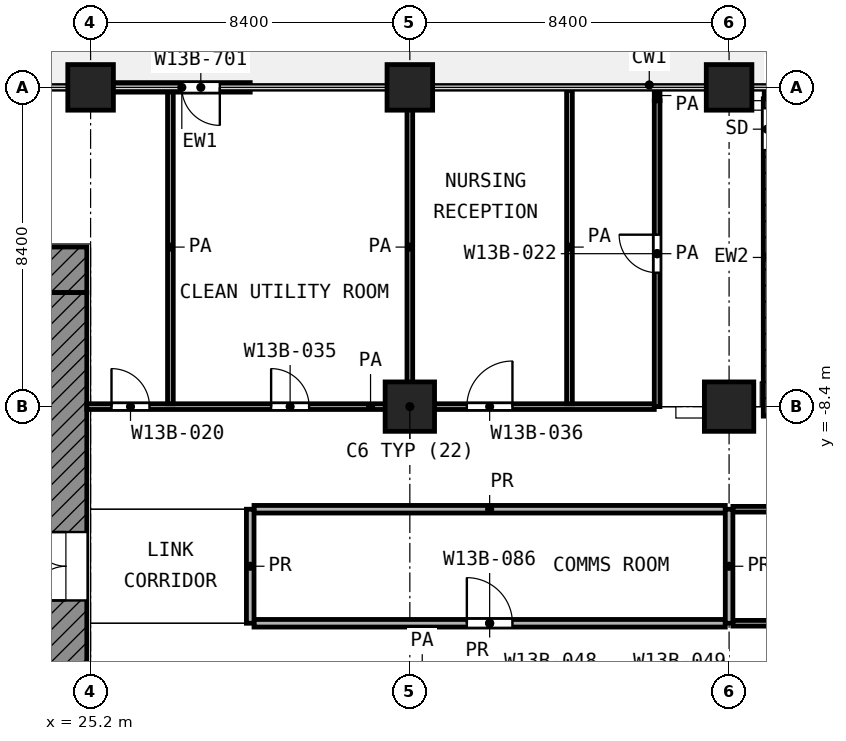
"""IFC4 building model, lengths in metres.
Left out: names, types, materials, properties, quantities, classifications, styles, units other than length and angle.
Written with IfcOpenShell. Run it as: python <this file> out.ifc"""

import sys

from ifc_helpers import new_model, si_unit, direction, frame, frame_2d, origin, origin_2d, place, context, subcontext, project, spatial, rectangle, extrude, element, fill, save


model = new_model("IFC4")
c1 = context("Model", 3, precision=1e-05, world=origin(), true_north=direction((0.0, 1.0)))
c2 = subcontext(c1, "Body", "Model", "MODEL_VIEW")
j1 = project(units=[si_unit("LENGTHUNIT", "METRE"), si_unit("PLANEANGLEUNIT", "RADIAN")], contexts=[c1])
p1 = place(None, origin())
s1 = spatial("IfcSite", under=j1, at=p1, CompositionType="ELEMENT")
p2 = place(p1, origin())
s2 = spatial("IfcBuilding", under=s1, at=p2, CompositionType="ELEMENT")
p3 = place(p2, frame((0.0, 0.0, 89.6)))
s3 = spatial("IfcBuildingStorey", under=s2, at=p3, CompositionType="ELEMENT", Elevation=89.6)
for number, where, z_axis, x_axis in (
    (1, (25.2, 0.0, 0.0), (0.0, 0.0, 1.0), (1.0, 0.0, 0.0)),
    (2, (33.6, 0.0, 0.0), (0.0, 0.0, 1.0), (1.0, 0.0, 0.0)),
    (3, (42.0, 0.0, 0.0), (0.0, 0.0, 1.0), (1.0, 0.0, 0.0)),
):
    element("IfcColumn", number, at=place(p3, frame(where, z_axis=z_axis, x_axis=x_axis)), inside=s3, PredefinedType="COLUMN", context=c2, shape_type="SweptSolid", body=[
        extrude(rectangle(XDim=1.2, YDim=1.2, at=origin_2d()), origin(), (0.0, 0.0, 1.0), 4.2),
    ])
for number, where, z_axis, x_axis in (
    (4, (33.6, -8.4, 0.0), (0.0, 0.0, 1.0), (1.0, 0.0, 0.0)),
    (5, (42.0, -8.4, 0.0), (0.0, 0.0, 1.0), (1.0, 0.0, 0.0)),
):
    element("IfcColumn", number, at=place(p3, frame(where, z_axis=z_axis, x_axis=x_axis)), inside=s3, PredefinedType="COLUMN", context=c2, shape_type="SweptSolid", body=[
        extrude(rectangle(XDim=1.3, YDim=1.3, at=origin_2d()), origin(), (0.0, 0.0, 1.0), 4.2),
    ])
p4 = place(p3, frame((29.4, 0.0, 0.0), z_axis=(0.0, 0.0, 1.0), x_axis=(-1.0, 0.0, 0.0)))
e6 = element("IfcWall", 6, at=p4, inside=s3, PredefinedType="SOLIDWALL", context=c2, shape_type="SweptSolid", body=[
    extrude(rectangle(XDim=3.6, YDim=0.25, at=frame_2d((1.8, 0.0))), origin(), (0.0, 0.0, 1.0), 3.58),
])
p5 = place(p4, frame((0.8, 0.0, 0.0)))
e7 = element("IfcOpeningElement", 7, at=p5, cuts=e6, PredefinedType="OPENING", context=c2, shape_type="SweptSolid", body=[
    extrude(rectangle(XDim=1.0, YDim=2.1, at=frame_2d((0.5, 1.05))), frame((0.0, 0.135, 0.0), z_axis=(0.0, -1.0, 0.0), x_axis=(1.0, 0.0, 0.0)), (0.0, 0.0, 1.0), 0.27),
])
p6 = place(p3, frame((4.2, -4.8, 0.0), z_axis=(0.0, 0.0, 1.0), x_axis=(1.0, 0.0, 0.0)))
e8 = element("IfcWall", 8, at=p6, inside=s3, PredefinedType="SHEAR", context=c2, shape_type="SweptSolid", body=[
    extrude(rectangle(XDim=20.9, YDim=1.2, at=frame_2d((10.45, 0.0))), origin(), (0.0, 0.0, 1.0), 3.7),
])
p7 = place(p6, frame((1.95, 0.0, 0.0)))
e9 = element("IfcOpeningElement", 9, at=p7, cuts=e8, PredefinedType="OPENING", context=c2, shape_type="SweptSolid", body=[
    extrude(rectangle(XDim=1.1, YDim=2.1, at=frame_2d((0.55, 1.05))), frame((0.0, 0.61, 0.0), z_axis=(0.0, -1.0, 0.0), x_axis=(1.0, 0.0, 0.0)), (0.0, 0.0, 1.0), 1.22),
])
p8 = place(p6, frame((17.95, 0.0, 0.0)))
e10 = element("IfcOpeningElement", 10, at=p8, cuts=e8, PredefinedType="OPENING", context=c2, shape_type="SweptSolid", body=[
    extrude(rectangle(XDim=1.1, YDim=2.1, at=frame_2d((0.55, 1.05))), frame((0.0, 0.61, 0.0), z_axis=(0.0, -1.0, 0.0), x_axis=(1.0, 0.0, 0.0)), (0.0, 0.0, 1.0), 1.22),
])
p9 = place(p3, frame((24.55, -24.0, 0.0), z_axis=(0.0, 0.0, 1.0), x_axis=(0.0, 1.0, 0.0)))
e11 = element("IfcWall", 11, at=p9, inside=s3, PredefinedType="SHEAR", context=c2, shape_type="SweptSolid", body=[
    extrude(rectangle(XDim=18.6, YDim=1.1, at=frame_2d((9.3, 0.0))), origin(), (0.0, 0.0, 1.0), 3.7),
])
p10 = place(p9, frame((10.5, 0.0, 0.0)))
e12 = element("IfcOpeningElement", 12, at=p10, cuts=e11, PredefinedType="OPENING", context=c2, shape_type="SweptSolid", body=[
    extrude(rectangle(XDim=1.8, YDim=2.1, at=frame_2d((0.9, 1.05))), frame((0.0, 0.56, 0.0), z_axis=(0.0, -1.0, 0.0), x_axis=(1.0, 0.0, 0.0)), (0.0, 0.0, 1.0), 1.12),
])
p11 = place(p3, frame((43.0, -8.65, 0.0), z_axis=(0.0, 0.0, 1.0), x_axis=(0.0, 1.0, 0.0)))
e13 = element("IfcWall", 13, at=p11, inside=s3, PredefinedType="SHEAR", context=c2, shape_type="SweptSolid", body=[
    extrude(rectangle(XDim=8.35, YDim=0.2, at=frame_2d((4.175, 0.0))), origin(), (0.0, 0.0, 1.0), 3.7),
])
p12 = place(p11, frame((7.0, 0.0, 0.0)))
e14 = element("IfcOpeningElement", 14, at=p12, cuts=e13, PredefinedType="OPENING", context=c2, shape_type="SweptSolid", body=[
    extrude(rectangle(XDim=1.1, YDim=2.1, at=frame_2d((0.55, 1.05))), frame((0.0, 0.11, 0.0), z_axis=(0.0, -1.0, 0.0), x_axis=(1.0, 0.0, 0.0)), (0.0, 0.0, 1.0), 0.22),
])
p13 = place(p3, frame((42.1, -14.1, 0.0), z_axis=(0.0, 0.0, 1.0), x_axis=(1.0, 0.0, 0.0)))
e15 = element("IfcWall", 15, at=p13, inside=s3, PredefinedType="PARTITIONING", context=c2, shape_type="SweptSolid", body=[
    extrude(rectangle(XDim=34.925, YDim=0.15, at=frame_2d((17.462, 0.0))), origin(), (0.0, 0.0, 1.0), 3.7),
])
p14 = place(p13, frame((20.55, 0.0, 0.0)))
e16 = element("IfcOpeningElement", 16, at=p14, cuts=e15, PredefinedType="OPENING", context=c2, shape_type="SweptSolid", body=[
    extrude(rectangle(XDim=1.0, YDim=2.1, at=frame_2d((0.5, 1.05))), frame((0.0, 0.085, 0.0), z_axis=(0.0, -1.0, 0.0), x_axis=(1.0, 0.0, 0.0)), (0.0, 0.0, 1.0), 0.17),
])
p15 = place(p13, frame((31.65, 0.0, 0.0)))
e17 = element("IfcOpeningElement", 17, at=p15, cuts=e15, PredefinedType="OPENING", context=c2, shape_type="SweptSolid", body=[
    extrude(rectangle(XDim=1.0, YDim=2.1, at=frame_2d((0.5, 1.05))), frame((0.0, 0.085, 0.0), z_axis=(0.0, -1.0, 0.0), x_axis=(1.0, 0.0, 0.0)), (0.0, 0.0, 1.0), 0.17),
])
p16 = place(p3, frame((42.1, -11.1, 0.0), z_axis=(0.0, 0.0, 1.0), x_axis=(1.0, 0.0, 0.0)))
e18 = element("IfcWall", 18, at=p16, inside=s3, PredefinedType="PARTITIONING", context=c2, shape_type="SweptSolid", body=[
    extrude(rectangle(XDim=34.925, YDim=0.15, at=frame_2d((17.462, 0.0))), origin(), (0.0, 0.0, 1.0), 3.7),
])
p17 = place(p16, frame((5.75, 0.0, 0.0)))
e19 = element("IfcOpeningElement", 19, at=p17, cuts=e18, PredefinedType="OPENING", context=c2, shape_type="SweptSolid", body=[
    extrude(rectangle(XDim=1.2, YDim=2.1, at=frame_2d((0.6, 1.05))), frame((0.0, 0.085, 0.0), z_axis=(0.0, -1.0, 0.0), x_axis=(1.0, 0.0, 0.0)), (0.0, 0.0, 1.0), 0.17),
])
p18 = place(p3, frame((25.1, -8.4, 0.0), z_axis=(0.0, 0.0, 1.0), x_axis=(1.0, 0.0, 0.0)))
e20 = element("IfcWall", 20, at=p18, inside=s3, PredefinedType="PARTITIONING", context=c2, shape_type="SweptSolid", body=[
    extrude(rectangle(XDim=14.932, YDim=0.15, at=frame_2d((7.466, 0.0))), origin(), (0.0, 0.0, 1.0), 3.7),
])
p19 = place(p18, frame((10.0, 0.0, 0.0)))
e21 = element("IfcOpeningElement", 21, at=p19, cuts=e20, PredefinedType="OPENING", context=c2, shape_type="SweptSolid", body=[
    extrude(rectangle(XDim=1.2, YDim=2.1, at=frame_2d((0.6, 1.05))), frame((0.0, 0.085, 0.0), z_axis=(0.0, -1.0, 0.0), x_axis=(1.0, 0.0, 0.0)), (0.0, 0.0, 1.0), 0.17),
])
p20 = place(p18, frame((0.65, 0.0, 0.0)))
e22 = element("IfcOpeningElement", 22, at=p20, cuts=e20, PredefinedType="OPENING", context=c2, shape_type="SweptSolid", body=[
    extrude(rectangle(XDim=1.0, YDim=2.1, at=frame_2d((0.5, 1.05))), frame((0.0, 0.085, 0.0), z_axis=(0.0, -1.0, 0.0), x_axis=(1.0, 0.0, 0.0)), (0.0, 0.0, 1.0), 0.17),
])
p21 = place(p18, frame((4.85, 0.0, 0.0)))
e23 = element("IfcOpeningElement", 23, at=p21, cuts=e20, PredefinedType="OPENING", context=c2, shape_type="SweptSolid", body=[
    extrude(rectangle(XDim=1.0, YDim=2.1, at=frame_2d((0.5, 1.05))), frame((0.0, 0.085, 0.0), z_axis=(0.0, -1.0, 0.0), x_axis=(1.0, 0.0, 0.0)), (0.0, 0.0, 1.0), 0.17),
])
for number, where, z_axis, x_axis in (
    (24, (27.3, -8.325, 0.0), (0.0, 0.0, 1.0), (0.0, 1.0, 0.0)),
    (25, (33.6, -8.325, 0.0), (0.0, 0.0, 1.0), (0.0, 1.0, 0.0)),
    (26, (37.8, -8.325, 0.0), (0.0, 0.0, 1.0), (0.0, 1.0, 0.0)),
):
    element("IfcWall", number, at=place(p3, frame(where, z_axis=z_axis, x_axis=x_axis)), inside=s3, PredefinedType="PARTITIONING", context=c2, shape_type="SweptSolid", body=[
        extrude(rectangle(XDim=8.245, YDim=0.15, at=frame_2d((4.123, 0.0))), origin(), (0.0, 0.0, 1.0), 3.7),
    ])
p22 = place(p3, frame((40.107, -8.4, 0.0), z_axis=(0.0, 0.0, 1.0), x_axis=(0.0, 1.0, 0.0)))
e27 = element("IfcWall", 27, at=p22, inside=s3, PredefinedType="PARTITIONING", context=c2, shape_type="SweptSolid", body=[
    extrude(rectangle(XDim=8.048, YDim=0.15, at=frame_2d((4.024, 0.0))), origin(), (0.0, 0.0, 1.0), 3.7),
])
p23 = place(p22, frame((3.524, 0.0, 0.0)))
e28 = element("IfcOpeningElement", 28, at=p23, cuts=e27, PredefinedType="OPENING", context=c2, shape_type="SweptSolid", body=[
    extrude(rectangle(XDim=1.0, YDim=2.1, at=frame_2d((0.5, 1.05))), frame((0.0, 0.085, 0.0), z_axis=(0.0, -1.0, 0.0), x_axis=(1.0, 0.0, 0.0)), (0.0, 0.0, 1.0), 0.17),
])
p24 = place(p3, frame((40.107, -0.35, 0.0), z_axis=(0.0, 0.0, 1.0), x_axis=(0.0, 1.0, 0.0)))
e29 = element("IfcWall", 29, at=p24, inside=s3, PredefinedType="PARTITIONING", context=c2, shape_type="SweptSolid", body=[
    extrude(rectangle(XDim=0.27, YDim=0.15, at=frame_2d((0.135, 0.0))), origin(), (0.0, 0.0, 1.0), 3.7),
])
p25 = place(p3, frame((43.0, -0.27, 0.0), z_axis=(0.0, 0.0, 1.0), x_axis=(0.0, 1.0, 0.0)))
e30 = element("IfcWall", 30, at=p25, inside=s3, PredefinedType="PARTITIONING", context=c2, shape_type="SweptSolid", body=[
    extrude(rectangle(XDim=0.19, YDim=0.15, at=frame_2d((0.095, 0.0))), origin(), (0.0, 0.0, 1.0), 3.7),
])
p26 = place(p3, frame((29.5, -14.1, 0.0), z_axis=(0.0, 0.0, 1.0), x_axis=(1.0, 0.0, 0.0)))
e31 = element("IfcWall", 31, at=p26, inside=s3, PredefinedType="PARTITIONING", context=c2, shape_type="SweptSolid", body=[
    extrude(rectangle(XDim=12.4, YDim=0.2, at=frame_2d((6.2, 0.0))), origin(), (0.0, 0.0, 1.0), 3.7),
])
p27 = place(p26, frame((5.6, 0.0, 0.0)))
e32 = element("IfcOpeningElement", 32, at=p27, cuts=e31, PredefinedType="OPENING", context=c2, shape_type="SweptSolid", body=[
    extrude(rectangle(XDim=1.2, YDim=2.1, at=frame_2d((0.6, 1.05))), frame((0.0, 0.11, 0.0), z_axis=(0.0, -1.0, 0.0), x_axis=(1.0, 0.0, 0.0)), (0.0, 0.0, 1.0), 0.22),
])
p28 = place(p3, frame((29.5, -11.1, 0.0), z_axis=(0.0, 0.0, 1.0), x_axis=(1.0, 0.0, 0.0)))
e33 = element("IfcWall", 33, at=p28, inside=s3, PredefinedType="PARTITIONING", context=c2, shape_type="SweptSolid", body=[
    extrude(rectangle(XDim=12.4, YDim=0.2, at=frame_2d((6.2, 0.0))), origin(), (0.0, 0.0, 1.0), 3.7),
])
for number, where, z_axis, x_axis in (
    (34, (29.4, -14.1, 0.0), (0.0, 0.0, 1.0), (0.0, 1.0, 0.0)),
    (35, (42.0, -14.1, 0.0), (0.0, 0.0, 1.0), (0.0, 1.0, 0.0)),
):
    element("IfcWall", number, at=place(p3, frame(where, z_axis=z_axis, x_axis=x_axis)), inside=s3, PredefinedType="PARTITIONING", context=c2, shape_type="SweptSolid", body=[
        extrude(rectangle(XDim=3.0, YDim=0.2, at=frame_2d((1.5, 0.0))), origin(), (0.0, 0.0, 1.0), 3.7),
    ])
p29 = place(p5, origin())
e36 = element("IfcDoor", 36, at=p29, inside=s3, OperationType="SINGLE_SWING_LEFT", PredefinedType="DOOR", context=c2, shape_type="SweptSolid", body=[
    extrude(rectangle(XDim=1.0, YDim=2.1, at=frame_2d((0.5, 1.05))), frame((0.0, 0.025, 0.0), z_axis=(0.0, -1.0, 0.0), x_axis=(1.0, 0.0, 0.0)), (0.0, 0.0, 1.0), 0.05),
])
fill(e7, e36)
p30 = place(p10, origin())
e37 = element("IfcDoor", 37, at=p30, inside=s3, OperationType="DOUBLE_DOOR_SINGLE_SWING", PredefinedType="DOOR", context=c2, shape_type="SweptSolid", body=[
    extrude(rectangle(XDim=1.8, YDim=2.1, at=frame_2d((0.9, 1.05))), frame((0.0, 0.025, 0.0), z_axis=(0.0, -1.0, 0.0), x_axis=(1.0, 0.0, 0.0)), (0.0, 0.0, 1.0), 0.05),
])
fill(e12, e37)
p31 = place(p12, frame((1.1, 0.0, 0.0), z_axis=(0.0, 0.0, 1.0), x_axis=(-1.0, 0.0, 0.0)))
e38 = element("IfcDoor", 38, at=p31, inside=s3, OperationType="SINGLE_SWING_LEFT", PredefinedType="DOOR", context=c2, shape_type="SweptSolid", body=[
    extrude(rectangle(XDim=1.1, YDim=2.1, at=frame_2d((0.55, 1.05))), frame((0.0, 0.025, 0.0), z_axis=(0.0, -1.0, 0.0), x_axis=(1.0, 0.0, 0.0)), (0.0, 0.0, 1.0), 0.05),
])
fill(e14, e38)
p32 = place(p19, origin())
e39 = element("IfcDoor", 39, at=p32, inside=s3, OperationType="SINGLE_SWING_RIGHT", PredefinedType="DOOR", context=c2, shape_type="SweptSolid", body=[
    extrude(rectangle(XDim=1.2, YDim=2.1, at=frame_2d((0.6, 1.05))), frame((0.0, 0.025, 0.0), z_axis=(0.0, -1.0, 0.0), x_axis=(1.0, 0.0, 0.0)), (0.0, 0.0, 1.0), 0.05),
])
fill(e21, e39)
p33 = place(p23, origin())
e40 = element("IfcDoor", 40, at=p33, inside=s3, OperationType="SINGLE_SWING_RIGHT", PredefinedType="DOOR", context=c2, shape_type="SweptSolid", body=[
    extrude(rectangle(XDim=1.0, YDim=2.1, at=frame_2d((0.5, 1.05))), frame((0.0, 0.025, 0.0), z_axis=(0.0, -1.0, 0.0), x_axis=(1.0, 0.0, 0.0)), (0.0, 0.0, 1.0), 0.05),
])
fill(e28, e40)
p34 = place(p27, origin())
e41 = element("IfcDoor", 41, at=p34, inside=s3, OperationType="SINGLE_SWING_LEFT", PredefinedType="DOOR", context=c2, shape_type="SweptSolid", body=[
    extrude(rectangle(XDim=1.2, YDim=2.1, at=frame_2d((0.6, 1.05))), frame((0.0, 0.025, 0.0), z_axis=(0.0, -1.0, 0.0), x_axis=(1.0, 0.0, 0.0)), (0.0, 0.0, 1.0), 0.05),
])
fill(e32, e41)
p35 = place(p20, origin())
e42 = element("IfcDoor", 42, at=p35, inside=s3, OperationType="SINGLE_SWING_LEFT", PredefinedType="DOOR", context=c2, shape_type="SweptSolid", body=[
    extrude(rectangle(XDim=1.0, YDim=2.1, at=frame_2d((0.5, 1.05))), frame((0.0, 0.025, 0.0), z_axis=(0.0, -1.0, 0.0), x_axis=(1.0, 0.0, 0.0)), (0.0, 0.0, 1.0), 0.05),
])
fill(e22, e42)
p36 = place(p21, origin())
e43 = element("IfcDoor", 43, at=p36, inside=s3, OperationType="SINGLE_SWING_LEFT", PredefinedType="DOOR", context=c2, shape_type="SweptSolid", body=[
    extrude(rectangle(XDim=1.0, YDim=2.1, at=frame_2d((0.5, 1.05))), frame((0.0, 0.025, 0.0), z_axis=(0.0, -1.0, 0.0), x_axis=(1.0, 0.0, 0.0)), (0.0, 0.0, 1.0), 0.05),
])
fill(e23, e43)
save(model, sys.argv[1])
